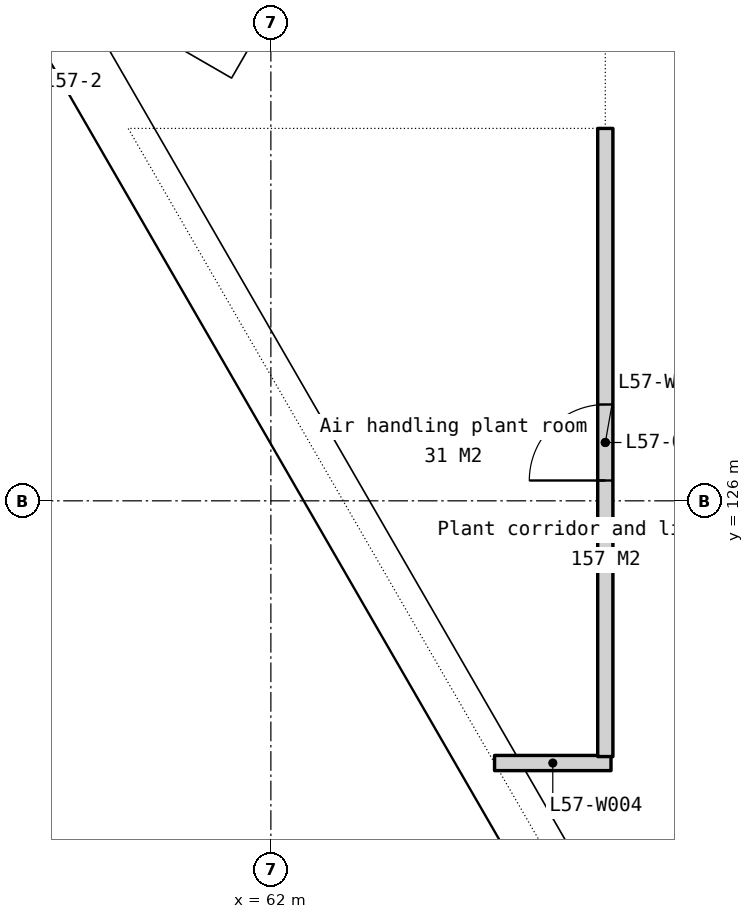
"""IFC4 building model, lengths in metres.
Left out: names, types, materials, properties, quantities, classifications, styles, units other than length and angle.
Written with IfcOpenShell. Run it as: python <this file> out.ifc"""

import sys

from ifc_helpers import new_model, si_unit, direction, frame, frame_2d, origin, place, context, subcontext, project, spatial, rectangle, extrude, element, fill, save


model = new_model("IFC4")
c1 = context("Model", 3, precision=1e-05, world=origin(), true_north=direction((0.0, 1.0)))
c2 = subcontext(c1, "Body", "Model", "MODEL_VIEW")
j1 = project(units=[si_unit("LENGTHUNIT", "METRE"), si_unit("PLANEANGLEUNIT", "RADIAN")], contexts=[c1])
p1 = place(None, origin())
s1 = spatial("IfcSite", under=j1, at=p1, CompositionType="ELEMENT")
p2 = place(p1, origin())
s2 = spatial("IfcBuilding", under=s1, at=p2, CompositionType="ELEMENT")
p3 = place(p2, frame((0.0, 0.0, 227.0)))
s3 = spatial("IfcBuildingStorey", under=s2, at=p3, CompositionType="ELEMENT", Elevation=227.0)
p4 = place(p3, frame((64.943, 122.55, 0.0), z_axis=(0.0, 0.0, 1.0), x_axis=(1.0, 0.0, 0.0)))
e1 = element("IfcWall", 1, at=p4, inside=s3, PredefinedType="PARTITIONING", context=c2, shape_type="SweptSolid", body=[
    extrude(rectangle(XDim=1.532, YDim=0.2, at=frame_2d((0.766, 0.0))), origin(), (0.0, 0.0, 1.0), 11.25),
])
p5 = place(p3, frame((66.4, 122.635, 0.0), z_axis=(0.0, 0.0, 1.0), x_axis=(0.0, 1.0, 0.0)))
e2 = element("IfcWall", 2, at=p5, inside=s3, PredefinedType="PARTITIONING", context=c2, shape_type="SweptSolid", body=[
    extrude(rectangle(XDim=8.265, YDim=0.2, at=frame_2d((4.132, 0.0))), origin(), (0.0, 0.0, 1.0), 11.25),
])
p6 = place(p5, frame((3.633, 0.0, 0.0)))
e3 = element("IfcOpeningElement", 3, at=p6, cuts=e2, PredefinedType="OPENING", context=c2, shape_type="SweptSolid", body=[
    extrude(rectangle(XDim=1.0, YDim=2.1, at=frame_2d((0.5, 1.05))), frame((0.0, 0.11, 0.0), z_axis=(0.0, -1.0, 0.0), x_axis=(1.0, 0.0, 0.0)), (0.0, 0.0, 1.0), 0.22),
])
p7 = place(p6, origin())
e4 = element("IfcDoor", 4, at=p7, inside=s3, OperationType="SINGLE_SWING_LEFT", PredefinedType="DOOR", context=c2, shape_type="SweptSolid", body=[
    extrude(rectangle(XDim=1.0, YDim=2.1, at=frame_2d((0.5, 1.05))), frame((0.0, 0.025, 0.0), z_axis=(0.0, -1.0, 0.0), x_axis=(1.0, 0.0, 0.0)), (0.0, 0.0, 1.0), 0.05),
])
fill(e3, e4)
save(model, sys.argv[1])
